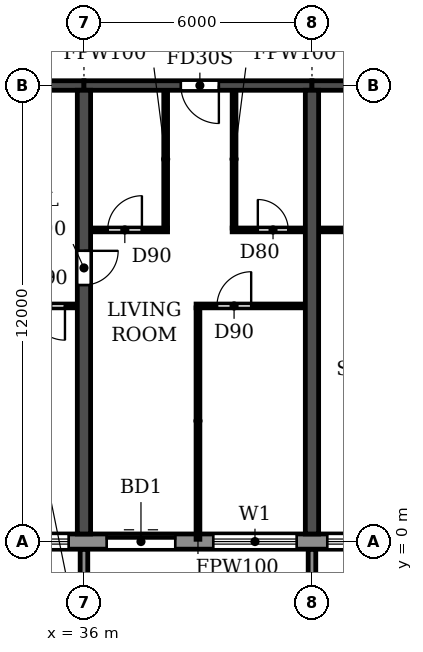
"""IFC4 building model, lengths in metres.
Left out: names, types, materials, properties, quantities, classifications, styles, units other than length and angle.
Written with IfcOpenShell. Run it as: python <this file> out.ifc"""

import sys

from ifc_helpers import new_model, si_unit, direction, frame, frame_2d, origin, place, context, subcontext, project, spatial, polyline, rectangle, outline, extrude, source, transform, mapped, element, fill, save


model = new_model("IFC4")
c1 = context("Model", 3, precision=1e-05, world=origin(), true_north=direction((0.0, 1.0)))
c2 = subcontext(c1, "Body", "Model", "MODEL_VIEW")
j1 = project(units=[si_unit("LENGTHUNIT", "METRE"), si_unit("PLANEANGLEUNIT", "RADIAN")], contexts=[c1])
p1 = place(None, origin())
s1 = spatial("IfcSite", under=j1, at=p1, CompositionType="ELEMENT")
p2 = place(p1, origin())
s2 = spatial("IfcBuilding", under=s1, at=p2, CompositionType="ELEMENT")
p3 = place(p2, frame((0.0, 0.0, 72.9)))
s3 = spatial("IfcBuildingStorey", under=s2, at=p3, CompositionType="ELEMENT", Elevation=72.9)
p4 = place(p3, frame((36.0, 0.2, 0.0), z_axis=(0.0, 0.0, 1.0), x_axis=(0.0, 1.0, 0.0)))
e1 = element("IfcWall", 1, at=p4, inside=s3, PredefinedType="SHEAR", context=c2, shape_type="SweptSolid", body=[
    extrude(rectangle(XDim=11.675, YDim=0.35, at=frame_2d((5.837, 0.0))), origin(), (0.0, 0.0, 1.0), 3.06),
])
p5 = place(p4, frame((6.55, 0.0, 0.0)))
e2 = element("IfcOpeningElement", 2, at=p5, cuts=e1, PredefinedType="OPENING", context=c2, shape_type="SweptSolid", body=[
    extrude(rectangle(XDim=0.9, YDim=2.1, at=frame_2d((0.45, 1.05))), frame((0.0, 0.185, 0.0), z_axis=(0.0, -1.0, 0.0), x_axis=(1.0, 0.0, 0.0)), (0.0, 0.0, 1.0), 0.37),
])
p6 = place(p3, frame((42.0, 0.2, 0.0), z_axis=(0.0, 0.0, 1.0), x_axis=(0.0, 1.0, 0.0)))
e3 = element("IfcWall", 3, at=p6, inside=s3, PredefinedType="SHEAR", context=c2, shape_type="SweptSolid", body=[
    extrude(rectangle(XDim=11.675, YDim=0.35, at=frame_2d((5.837, 0.0))), origin(), (0.0, 0.0, 1.0), 3.06),
])
p7 = place(p3, frame((30.0, 12.0, 0.0), z_axis=(0.0, 0.0, 1.0), x_axis=(1.0, 0.0, 0.0)))
e4 = element("IfcWall", 4, at=p7, inside=s3, PredefinedType="SHEAR", context=c2, shape_type="SweptSolid", body=[
    extrude(rectangle(XDim=6.0, YDim=0.25, at=frame_2d((3.0, 0.0))), origin(), (0.0, 0.0, 1.0), 2.46),
])
p8 = place(p3, frame((36.0, 12.0, 0.0), z_axis=(0.0, 0.0, 1.0), x_axis=(1.0, 0.0, 0.0)))
e5 = element("IfcWall", 5, at=p8, inside=s3, PredefinedType="SHEAR", context=c2, shape_type="SweptSolid", body=[
    extrude(rectangle(XDim=6.0, YDim=0.25, at=frame_2d((3.0, 0.0))), origin(), (0.0, 0.0, 1.0), 2.46),
])
p9 = place(p8, frame((2.55, 0.0, 0.0)))
e6 = element("IfcOpeningElement", 6, at=p9, cuts=e5, PredefinedType="OPENING", context=c2, shape_type="SweptSolid", body=[
    extrude(rectangle(XDim=1.0, YDim=2.1, at=frame_2d((0.5, 1.05))), frame((0.0, 0.135, 0.0), z_axis=(0.0, -1.0, 0.0), x_axis=(1.0, 0.0, 0.0)), (0.0, 0.0, 1.0), 0.27),
])
p10 = place(p3, frame((42.0, 12.0, 0.0), z_axis=(0.0, 0.0, 1.0), x_axis=(1.0, 0.0, 0.0)))
e7 = element("IfcWall", 7, at=p10, inside=s3, PredefinedType="SHEAR", context=c2, shape_type="SweptSolid", body=[
    extrude(rectangle(XDim=6.0, YDim=0.25, at=frame_2d((3.0, 0.0))), origin(), (0.0, 0.0, 1.0), 2.46),
])
p11 = place(p10, frame((2.55, 0.0, 0.0)))
e8 = element("IfcOpeningElement", 8, at=p11, cuts=e7, PredefinedType="OPENING", context=c2, shape_type="SweptSolid", body=[
    extrude(rectangle(XDim=1.0, YDim=2.1, at=frame_2d((0.5, 1.05))), frame((0.0, 0.135, 0.0), z_axis=(0.0, -1.0, 0.0), x_axis=(1.0, 0.0, 0.0)), (0.0, 0.0, 1.0), 0.27),
])
p12 = place(p3, frame((10.683, 0.0, 0.0), z_axis=(0.0, 0.0, 1.0), x_axis=(1.0, 0.0, 0.0)))
e9 = element("IfcWall", 9, at=p12, inside=s3, PredefinedType="STANDARD", context=c2, shape_type="SweptSolid", body=[
    extrude(rectangle(XDim=80.634, YDim=0.4, at=frame_2d((40.317, 0.0))), origin(), (0.0, 0.0, 1.0), 3.06),
])
p13 = place(p12, frame((1.717, 0.0, 0.9)))
e10 = element("IfcOpeningElement", 10, at=p13, cuts=e9, PredefinedType="OPENING", context=c2, shape_type="SweptSolid", body=[
    extrude(rectangle(XDim=2.2, YDim=1.5, at=frame_2d((1.1, 0.75))), frame((0.0, 0.21, 0.0), z_axis=(0.0, -1.0, 0.0), x_axis=(1.0, 0.0, 0.0)), (0.0, 0.0, 1.0), 0.42),
])
p14 = place(p12, frame((4.917, 0.0, 0.0)))
e11 = element("IfcOpeningElement", 11, at=p14, cuts=e9, PredefinedType="OPENING", context=c2, shape_type="SweptSolid", body=[
    extrude(rectangle(XDim=1.8, YDim=2.4, at=frame_2d((0.9, 1.2))), frame((0.0, 0.21, 0.0), z_axis=(0.0, -1.0, 0.0), x_axis=(1.0, 0.0, 0.0)), (0.0, 0.0, 1.0), 0.42),
])
p15 = place(p12, frame((7.717, 0.0, 0.9)))
e12 = element("IfcOpeningElement", 12, at=p15, cuts=e9, PredefinedType="OPENING", context=c2, shape_type="SweptSolid", body=[
    extrude(rectangle(XDim=2.2, YDim=1.5, at=frame_2d((1.1, 0.75))), frame((0.0, 0.21, 0.0), z_axis=(0.0, -1.0, 0.0), x_axis=(1.0, 0.0, 0.0)), (0.0, 0.0, 1.0), 0.42),
])
p16 = place(p12, frame((10.717, 0.0, 0.9)))
e13 = element("IfcOpeningElement", 13, at=p16, cuts=e9, PredefinedType="OPENING", context=c2, shape_type="SweptSolid", body=[
    extrude(rectangle(XDim=2.2, YDim=1.5, at=frame_2d((1.1, 0.75))), frame((0.0, 0.21, 0.0), z_axis=(0.0, -1.0, 0.0), x_axis=(1.0, 0.0, 0.0)), (0.0, 0.0, 1.0), 0.42),
])
p17 = place(p12, frame((13.717, 0.0, 0.9)))
e14 = element("IfcOpeningElement", 14, at=p17, cuts=e9, PredefinedType="OPENING", context=c2, shape_type="SweptSolid", body=[
    extrude(rectangle(XDim=2.2, YDim=1.5, at=frame_2d((1.1, 0.75))), frame((0.0, 0.21, 0.0), z_axis=(0.0, -1.0, 0.0), x_axis=(1.0, 0.0, 0.0)), (0.0, 0.0, 1.0), 0.42),
])
p18 = place(p12, frame((16.917, 0.0, 0.0)))
e15 = element("IfcOpeningElement", 15, at=p18, cuts=e9, PredefinedType="OPENING", context=c2, shape_type="SweptSolid", body=[
    extrude(rectangle(XDim=1.8, YDim=2.4, at=frame_2d((0.9, 1.2))), frame((0.0, 0.21, 0.0), z_axis=(0.0, -1.0, 0.0), x_axis=(1.0, 0.0, 0.0)), (0.0, 0.0, 1.0), 0.42),
])
p19 = place(p12, frame((19.717, 0.0, 0.9)))
e16 = element("IfcOpeningElement", 16, at=p19, cuts=e9, PredefinedType="OPENING", context=c2, shape_type="SweptSolid", body=[
    extrude(rectangle(XDim=2.2, YDim=1.5, at=frame_2d((1.1, 0.75))), frame((0.0, 0.21, 0.0), z_axis=(0.0, -1.0, 0.0), x_axis=(1.0, 0.0, 0.0)), (0.0, 0.0, 1.0), 0.42),
])
p20 = place(p12, frame((22.717, 0.0, 0.9)))
e17 = element("IfcOpeningElement", 17, at=p20, cuts=e9, PredefinedType="OPENING", context=c2, shape_type="SweptSolid", body=[
    extrude(rectangle(XDim=2.2, YDim=1.5, at=frame_2d((1.1, 0.75))), frame((0.0, 0.21, 0.0), z_axis=(0.0, -1.0, 0.0), x_axis=(1.0, 0.0, 0.0)), (0.0, 0.0, 1.0), 0.42),
])
p21 = place(p12, frame((25.917, 0.0, 0.0)))
e18 = element("IfcOpeningElement", 18, at=p21, cuts=e9, PredefinedType="OPENING", context=c2, shape_type="SweptSolid", body=[
    extrude(rectangle(XDim=1.8, YDim=2.4, at=frame_2d((0.9, 1.2))), frame((0.0, 0.21, 0.0), z_axis=(0.0, -1.0, 0.0), x_axis=(1.0, 0.0, 0.0)), (0.0, 0.0, 1.0), 0.42),
])
p22 = place(p12, frame((28.717, 0.0, 0.9)))
e19 = element("IfcOpeningElement", 19, at=p22, cuts=e9, PredefinedType="OPENING", context=c2, shape_type="SweptSolid", body=[
    extrude(rectangle(XDim=2.2, YDim=1.5, at=frame_2d((1.1, 0.75))), frame((0.0, 0.21, 0.0), z_axis=(0.0, -1.0, 0.0), x_axis=(1.0, 0.0, 0.0)), (0.0, 0.0, 1.0), 0.42),
])
p23 = place(p12, frame((31.717, 0.0, 0.9)))
e20 = element("IfcOpeningElement", 20, at=p23, cuts=e9, PredefinedType="OPENING", context=c2, shape_type="SweptSolid", body=[
    extrude(rectangle(XDim=2.2, YDim=1.5, at=frame_2d((1.1, 0.75))), frame((0.0, 0.21, 0.0), z_axis=(0.0, -1.0, 0.0), x_axis=(1.0, 0.0, 0.0)), (0.0, 0.0, 1.0), 0.42),
])
p24 = place(p12, frame((34.717, 0.0, 0.9)))
e21 = element("IfcOpeningElement", 21, at=p24, cuts=e9, PredefinedType="OPENING", context=c2, shape_type="SweptSolid", body=[
    extrude(rectangle(XDim=2.2, YDim=1.5, at=frame_2d((1.1, 0.75))), frame((0.0, 0.21, 0.0), z_axis=(0.0, -1.0, 0.0), x_axis=(1.0, 0.0, 0.0)), (0.0, 0.0, 1.0), 0.42),
])
p25 = place(p12, frame((37.917, 0.0, 0.0)))
e22 = element("IfcOpeningElement", 22, at=p25, cuts=e9, PredefinedType="OPENING", context=c2, shape_type="SweptSolid", body=[
    extrude(rectangle(XDim=1.8, YDim=2.4, at=frame_2d((0.9, 1.2))), frame((0.0, 0.21, 0.0), z_axis=(0.0, -1.0, 0.0), x_axis=(1.0, 0.0, 0.0)), (0.0, 0.0, 1.0), 0.42),
])
p26 = place(p12, frame((40.717, 0.0, 0.9)))
e23 = element("IfcOpeningElement", 23, at=p26, cuts=e9, PredefinedType="OPENING", context=c2, shape_type="SweptSolid", body=[
    extrude(rectangle(XDim=2.2, YDim=1.5, at=frame_2d((1.1, 0.75))), frame((0.0, 0.21, 0.0), z_axis=(0.0, -1.0, 0.0), x_axis=(1.0, 0.0, 0.0)), (0.0, 0.0, 1.0), 0.42),
])
p27 = place(p12, frame((43.717, 0.0, 0.9)))
e24 = element("IfcOpeningElement", 24, at=p27, cuts=e9, PredefinedType="OPENING", context=c2, shape_type="SweptSolid", body=[
    extrude(rectangle(XDim=2.2, YDim=1.5, at=frame_2d((1.1, 0.75))), frame((0.0, 0.21, 0.0), z_axis=(0.0, -1.0, 0.0), x_axis=(1.0, 0.0, 0.0)), (0.0, 0.0, 1.0), 0.42),
])
p28 = place(p12, frame((46.717, 0.0, 0.9)))
e25 = element("IfcOpeningElement", 25, at=p28, cuts=e9, PredefinedType="OPENING", context=c2, shape_type="SweptSolid", body=[
    extrude(rectangle(XDim=2.2, YDim=1.5, at=frame_2d((1.1, 0.75))), frame((0.0, 0.21, 0.0), z_axis=(0.0, -1.0, 0.0), x_axis=(1.0, 0.0, 0.0)), (0.0, 0.0, 1.0), 0.42),
])
p29 = place(p12, frame((49.917, 0.0, 0.0)))
e26 = element("IfcOpeningElement", 26, at=p29, cuts=e9, PredefinedType="OPENING", context=c2, shape_type="SweptSolid", body=[
    extrude(rectangle(XDim=1.8, YDim=2.4, at=frame_2d((0.9, 1.2))), frame((0.0, 0.21, 0.0), z_axis=(0.0, -1.0, 0.0), x_axis=(1.0, 0.0, 0.0)), (0.0, 0.0, 1.0), 0.42),
])
p30 = place(p12, frame((52.717, 0.0, 0.9)))
e27 = element("IfcOpeningElement", 27, at=p30, cuts=e9, PredefinedType="OPENING", context=c2, shape_type="SweptSolid", body=[
    extrude(rectangle(XDim=2.2, YDim=1.5, at=frame_2d((1.1, 0.75))), frame((0.0, 0.21, 0.0), z_axis=(0.0, -1.0, 0.0), x_axis=(1.0, 0.0, 0.0)), (0.0, 0.0, 1.0), 0.42),
])
p31 = place(p12, frame((55.717, 0.0, 0.9)))
e28 = element("IfcOpeningElement", 28, at=p31, cuts=e9, PredefinedType="OPENING", context=c2, shape_type="SweptSolid", body=[
    extrude(rectangle(XDim=2.2, YDim=1.5, at=frame_2d((1.1, 0.75))), frame((0.0, 0.21, 0.0), z_axis=(0.0, -1.0, 0.0), x_axis=(1.0, 0.0, 0.0)), (0.0, 0.0, 1.0), 0.42),
])
p32 = place(p12, frame((58.717, 0.0, 0.9)))
e29 = element("IfcOpeningElement", 29, at=p32, cuts=e9, PredefinedType="OPENING", context=c2, shape_type="SweptSolid", body=[
    extrude(rectangle(XDim=2.2, YDim=1.5, at=frame_2d((1.1, 0.75))), frame((0.0, 0.21, 0.0), z_axis=(0.0, -1.0, 0.0), x_axis=(1.0, 0.0, 0.0)), (0.0, 0.0, 1.0), 0.42),
])
p33 = place(p12, frame((61.717, 0.0, 0.9)))
e30 = element("IfcOpeningElement", 30, at=p33, cuts=e9, PredefinedType="OPENING", context=c2, shape_type="SweptSolid", body=[
    extrude(rectangle(XDim=2.2, YDim=1.5, at=frame_2d((1.1, 0.75))), frame((0.0, 0.21, 0.0), z_axis=(0.0, -1.0, 0.0), x_axis=(1.0, 0.0, 0.0)), (0.0, 0.0, 1.0), 0.42),
])
p34 = place(p12, frame((64.917, 0.0, 0.0)))
e31 = element("IfcOpeningElement", 31, at=p34, cuts=e9, PredefinedType="OPENING", context=c2, shape_type="SweptSolid", body=[
    extrude(rectangle(XDim=1.8, YDim=2.4, at=frame_2d((0.9, 1.2))), frame((0.0, 0.21, 0.0), z_axis=(0.0, -1.0, 0.0), x_axis=(1.0, 0.0, 0.0)), (0.0, 0.0, 1.0), 0.42),
])
p35 = place(p12, frame((67.717, 0.0, 0.9)))
e32 = element("IfcOpeningElement", 32, at=p35, cuts=e9, PredefinedType="OPENING", context=c2, shape_type="SweptSolid", body=[
    extrude(rectangle(XDim=2.2, YDim=1.5, at=frame_2d((1.1, 0.75))), frame((0.0, 0.21, 0.0), z_axis=(0.0, -1.0, 0.0), x_axis=(1.0, 0.0, 0.0)), (0.0, 0.0, 1.0), 0.42),
])
p36 = place(p12, frame((70.717, 0.0, 0.9)))
e33 = element("IfcOpeningElement", 33, at=p36, cuts=e9, PredefinedType="OPENING", context=c2, shape_type="SweptSolid", body=[
    extrude(rectangle(XDim=2.2, YDim=1.5, at=frame_2d((1.1, 0.75))), frame((0.0, 0.21, 0.0), z_axis=(0.0, -1.0, 0.0), x_axis=(1.0, 0.0, 0.0)), (0.0, 0.0, 1.0), 0.42),
])
p37 = place(p12, frame((73.917, 0.0, 0.0)))
e34 = element("IfcOpeningElement", 34, at=p37, cuts=e9, PredefinedType="OPENING", context=c2, shape_type="SweptSolid", body=[
    extrude(rectangle(XDim=1.8, YDim=2.4, at=frame_2d((0.9, 1.2))), frame((0.0, 0.21, 0.0), z_axis=(0.0, -1.0, 0.0), x_axis=(1.0, 0.0, 0.0)), (0.0, 0.0, 1.0), 0.42),
])
p38 = place(p12, frame((76.717, 0.0, 0.9)))
e35 = element("IfcOpeningElement", 35, at=p38, cuts=e9, PredefinedType="OPENING", context=c2, shape_type="SweptSolid", body=[
    extrude(rectangle(XDim=2.2, YDim=1.5, at=frame_2d((1.1, 0.75))), frame((0.0, 0.21, 0.0), z_axis=(0.0, -1.0, 0.0), x_axis=(1.0, 0.0, 0.0)), (0.0, 0.0, 1.0), 0.42),
])
m1 = source(origin(), c2, "Body", "SweptSolid", [
    extrude(outline(polyline([(0.0, 0.0), (0.2, 0.0), (0.2, 1.65), (0.0, 1.65), (0.0, 0.0)])), origin(), (0.0, 0.0, 1.0), 3.1),
])
for number, where in (
    (36, (35.9, -1.85, 0.0)),
    (37, (41.9, -1.85, 0.0)),
):
    element("IfcWall", number, at=place(p3, frame(where)), inside=s3, PredefinedType="STANDARD", context=c2, shape_type="MappedRepresentation", body=[
        mapped(m1, transform((0.0, 0.0, 0.0))),
    ])
p39 = place(p3, frame((30.185, 6.2, 0.0), z_axis=(0.0, 0.0, 1.0), x_axis=(1.0, 0.0, 0.0)))
e38 = element("IfcWall", 38, at=p39, inside=s3, PredefinedType="PARTITIONING", context=c2, shape_type="SweptSolid", body=[
    extrude(rectangle(XDim=5.63, YDim=0.1, at=frame_2d((2.815, 0.0))), origin(), (0.0, 0.0, 1.0), 3.06),
])
p40 = place(p39, frame((0.315, 0.0, 0.0)))
e39 = element("IfcOpeningElement", 39, at=p40, cuts=e38, PredefinedType="OPENING", context=c2, shape_type="SweptSolid", body=[
    extrude(rectangle(XDim=0.9, YDim=2.1, at=frame_2d((0.45, 1.05))), frame((0.0, 0.06, 0.0), z_axis=(0.0, -1.0, 0.0), x_axis=(1.0, 0.0, 0.0)), (0.0, 0.0, 1.0), 0.12),
])
p41 = place(p39, frame((4.415, 0.0, 0.0)))
e40 = element("IfcOpeningElement", 40, at=p41, cuts=e38, PredefinedType="OPENING", context=c2, shape_type="SweptSolid", body=[
    extrude(rectangle(XDim=0.9, YDim=2.1, at=frame_2d((0.45, 1.05))), frame((0.0, 0.06, 0.0), z_axis=(0.0, -1.0, 0.0), x_axis=(1.0, 0.0, 0.0)), (0.0, 0.0, 1.0), 0.12),
])
p42 = place(p3, frame((38.95, 6.2, 0.0), z_axis=(0.0, 0.0, 1.0), x_axis=(1.0, 0.0, 0.0)))
e41 = element("IfcWall", 41, at=p42, inside=s3, PredefinedType="PARTITIONING", context=c2, shape_type="SweptSolid", body=[
    extrude(rectangle(XDim=2.865, YDim=0.1, at=frame_2d((1.433, 0.0))), origin(), (0.0, 0.0, 1.0), 3.06),
])
p43 = place(p42, frame((0.55, 0.0, 0.0)))
e42 = element("IfcOpeningElement", 42, at=p43, cuts=e41, PredefinedType="OPENING", context=c2, shape_type="SweptSolid", body=[
    extrude(rectangle(XDim=0.9, YDim=2.1, at=frame_2d((0.45, 1.05))), frame((0.0, 0.06, 0.0), z_axis=(0.0, -1.0, 0.0), x_axis=(1.0, 0.0, 0.0)), (0.0, 0.0, 1.0), 0.12),
])
p44 = place(p3, frame((36.185, 8.2, 0.0), z_axis=(0.0, 0.0, 1.0), x_axis=(1.0, 0.0, 0.0)))
e43 = element("IfcWall", 43, at=p44, inside=s3, PredefinedType="PARTITIONING", context=c2, shape_type="SweptSolid", body=[
    extrude(rectangle(XDim=2.015, YDim=0.1, at=frame_2d((1.007, 0.0))), origin(), (0.0, 0.0, 1.0), 3.06),
])
p45 = place(p44, frame((0.44, 0.0, 0.0)))
e44 = element("IfcOpeningElement", 44, at=p45, cuts=e43, PredefinedType="OPENING", context=c2, shape_type="SweptSolid", body=[
    extrude(rectangle(XDim=0.9, YDim=2.1, at=frame_2d((0.45, 1.05))), frame((0.0, 0.06, 0.0), z_axis=(0.0, -1.0, 0.0), x_axis=(1.0, 0.0, 0.0)), (0.0, 0.0, 1.0), 0.12),
])
p46 = place(p3, frame((39.9, 8.2, 0.0), z_axis=(0.0, 0.0, 1.0), x_axis=(1.0, 0.0, 0.0)))
e45 = element("IfcWall", 45, at=p46, inside=s3, PredefinedType="PARTITIONING", context=c2, shape_type="SweptSolid", body=[
    extrude(rectangle(XDim=1.915, YDim=0.1, at=frame_2d((0.958, 0.0))), origin(), (0.0, 0.0, 1.0), 3.06),
])
p47 = place(p46, frame((0.675, 0.0, 0.0)))
e46 = element("IfcOpeningElement", 46, at=p47, cuts=e45, PredefinedType="OPENING", context=c2, shape_type="SweptSolid", body=[
    extrude(rectangle(XDim=0.8, YDim=2.1, at=frame_2d((0.4, 1.05))), frame((0.0, 0.06, 0.0), z_axis=(0.0, -1.0, 0.0), x_axis=(1.0, 0.0, 0.0)), (0.0, 0.0, 1.0), 0.12),
])
p48 = place(p3, frame((42.185, 8.2, 0.0), z_axis=(0.0, 0.0, 1.0), x_axis=(1.0, 0.0, 0.0)))
e47 = element("IfcWall", 47, at=p48, inside=s3, PredefinedType="PARTITIONING", context=c2, shape_type="SweptSolid", body=[
    extrude(rectangle(XDim=2.015, YDim=0.1, at=frame_2d((1.007, 0.0))), origin(), (0.0, 0.0, 1.0), 3.06),
])
p49 = place(p3, frame((38.15, 8.25, 0.0), z_axis=(0.0, 0.0, 1.0), x_axis=(0.0, 1.0, 0.0)))
e48 = element("IfcWall", 48, at=p49, inside=s3, PredefinedType="PARTITIONING", context=c2, shape_type="SweptSolid", body=[
    extrude(rectangle(XDim=3.615, YDim=0.1, at=frame_2d((1.808, 0.0))), origin(), (0.0, 0.0, 1.0), 3.06),
])
p50 = place(p3, frame((39.0, 0.06, 0.0), z_axis=(0.0, 0.0, 1.0), x_axis=(0.0, 1.0, 0.0)))
e49 = element("IfcWall", 49, at=p50, inside=s3, PredefinedType="PARTITIONING", context=c2, shape_type="SweptSolid", body=[
    extrude(rectangle(XDim=6.09, YDim=0.1, at=frame_2d((3.045, 0.0))), origin(), (0.0, 0.0, 1.0), 3.06),
])
p51 = place(p3, frame((39.95, 8.25, 0.0), z_axis=(0.0, 0.0, 1.0), x_axis=(0.0, 1.0, 0.0)))
e50 = element("IfcWall", 50, at=p51, inside=s3, PredefinedType="PARTITIONING", context=c2, shape_type="SweptSolid", body=[
    extrude(rectangle(XDim=3.615, YDim=0.1, at=frame_2d((1.808, 0.0))), origin(), (0.0, 0.0, 1.0), 3.06),
])
p52 = place(p20, origin())
e51 = element("IfcWindow", 51, at=p52, inside=s3, PartitioningType="DOUBLE_PANEL_HORIZONTAL", PredefinedType="WINDOW", context=c2, shape_type="SweptSolid", body=[
    extrude(rectangle(XDim=2.2, YDim=1.5, at=frame_2d((1.1, 0.75))), frame((0.0, 0.03, 0.0), z_axis=(0.0, -1.0, 0.0), x_axis=(1.0, 0.0, 0.0)), (0.0, 0.0, 1.0), 0.06),
])
fill(e17, e51)
p53 = place(p21, origin())
e52 = element("IfcDoor", 52, at=p53, inside=s3, OperationType="DOUBLE_DOOR_SLIDING", PredefinedType="DOOR", context=c2, shape_type="SweptSolid", body=[
    extrude(rectangle(XDim=1.8, YDim=2.4, at=frame_2d((0.9, 1.2))), frame((0.0, 0.025, 0.0), z_axis=(0.0, -1.0, 0.0), x_axis=(1.0, 0.0, 0.0)), (0.0, 0.0, 1.0), 0.05),
])
fill(e18, e52)
p54 = place(p22, origin())
e53 = element("IfcWindow", 53, at=p54, inside=s3, PartitioningType="DOUBLE_PANEL_HORIZONTAL", PredefinedType="WINDOW", context=c2, shape_type="SweptSolid", body=[
    extrude(rectangle(XDim=2.2, YDim=1.5, at=frame_2d((1.1, 0.75))), frame((0.0, 0.03, 0.0), z_axis=(0.0, -1.0, 0.0), x_axis=(1.0, 0.0, 0.0)), (0.0, 0.0, 1.0), 0.06),
])
fill(e19, e53)
p55 = place(p23, origin())
e54 = element("IfcWindow", 54, at=p55, inside=s3, PartitioningType="DOUBLE_PANEL_HORIZONTAL", PredefinedType="WINDOW", context=c2, shape_type="SweptSolid", body=[
    extrude(rectangle(XDim=2.2, YDim=1.5, at=frame_2d((1.1, 0.75))), frame((0.0, 0.03, 0.0), z_axis=(0.0, -1.0, 0.0), x_axis=(1.0, 0.0, 0.0)), (0.0, 0.0, 1.0), 0.06),
])
fill(e20, e54)
p56 = place(p41, frame((0.9, 0.0, 0.0), z_axis=(0.0, 0.0, 1.0), x_axis=(-1.0, 0.0, 0.0)))
e55 = element("IfcDoor", 55, at=p56, inside=s3, OperationType="SINGLE_SWING_LEFT", PredefinedType="DOOR", context=c2, shape_type="SweptSolid", body=[
    extrude(rectangle(XDim=0.9, YDim=2.1, at=frame_2d((0.45, 1.05))), frame((0.0, 0.025, 0.0), z_axis=(0.0, -1.0, 0.0), x_axis=(1.0, 0.0, 0.0)), (0.0, 0.0, 1.0), 0.05),
])
fill(e40, e55)
p57 = place(p5, frame((0.9, 0.0, 0.0), z_axis=(0.0, 0.0, 1.0), x_axis=(-1.0, 0.0, 0.0)))
e56 = element("IfcDoor", 56, at=p57, inside=s3, OperationType="SINGLE_SWING_LEFT", PredefinedType="DOOR", context=c2, shape_type="SweptSolid", body=[
    extrude(rectangle(XDim=0.9, YDim=2.1, at=frame_2d((0.45, 1.05))), frame((0.0, 0.025, 0.0), z_axis=(0.0, -1.0, 0.0), x_axis=(1.0, 0.0, 0.0)), (0.0, 0.0, 1.0), 0.05),
])
fill(e2, e56)
p58 = place(p45, origin())
e57 = element("IfcDoor", 57, at=p58, inside=s3, OperationType="SINGLE_SWING_RIGHT", PredefinedType="DOOR", context=c2, shape_type="SweptSolid", body=[
    extrude(rectangle(XDim=0.9, YDim=2.1, at=frame_2d((0.45, 1.05))), frame((0.0, 0.025, 0.0), z_axis=(0.0, -1.0, 0.0), x_axis=(1.0, 0.0, 0.0)), (0.0, 0.0, 1.0), 0.05),
])
fill(e44, e57)
p59 = place(p9, frame((1.0, 0.0, 0.0), z_axis=(0.0, 0.0, 1.0), x_axis=(-1.0, 0.0, 0.0)))
e58 = element("IfcDoor", 58, at=p59, inside=s3, OperationType="SINGLE_SWING_LEFT", PredefinedType="DOOR", context=c2, shape_type="SweptSolid", body=[
    extrude(rectangle(XDim=1.0, YDim=2.1, at=frame_2d((0.5, 1.05))), frame((0.0, 0.025, 0.0), z_axis=(0.0, -1.0, 0.0), x_axis=(1.0, 0.0, 0.0)), (0.0, 0.0, 1.0), 0.05),
])
fill(e6, e58)
p60 = place(p43, origin())
e59 = element("IfcDoor", 59, at=p60, inside=s3, OperationType="SINGLE_SWING_RIGHT", PredefinedType="DOOR", context=c2, shape_type="SweptSolid", body=[
    extrude(rectangle(XDim=0.9, YDim=2.1, at=frame_2d((0.45, 1.05))), frame((0.0, 0.025, 0.0), z_axis=(0.0, -1.0, 0.0), x_axis=(1.0, 0.0, 0.0)), (0.0, 0.0, 1.0), 0.05),
])
fill(e42, e59)
p61 = place(p47, origin())
e60 = element("IfcDoor", 60, at=p61, inside=s3, OperationType="SINGLE_SWING_LEFT", PredefinedType="DOOR", context=c2, shape_type="SweptSolid", body=[
    extrude(rectangle(XDim=0.8, YDim=2.1, at=frame_2d((0.4, 1.05))), frame((0.0, 0.025, 0.0), z_axis=(0.0, -1.0, 0.0), x_axis=(1.0, 0.0, 0.0)), (0.0, 0.0, 1.0), 0.05),
])
fill(e46, e60)
save(model, sys.argv[1])
